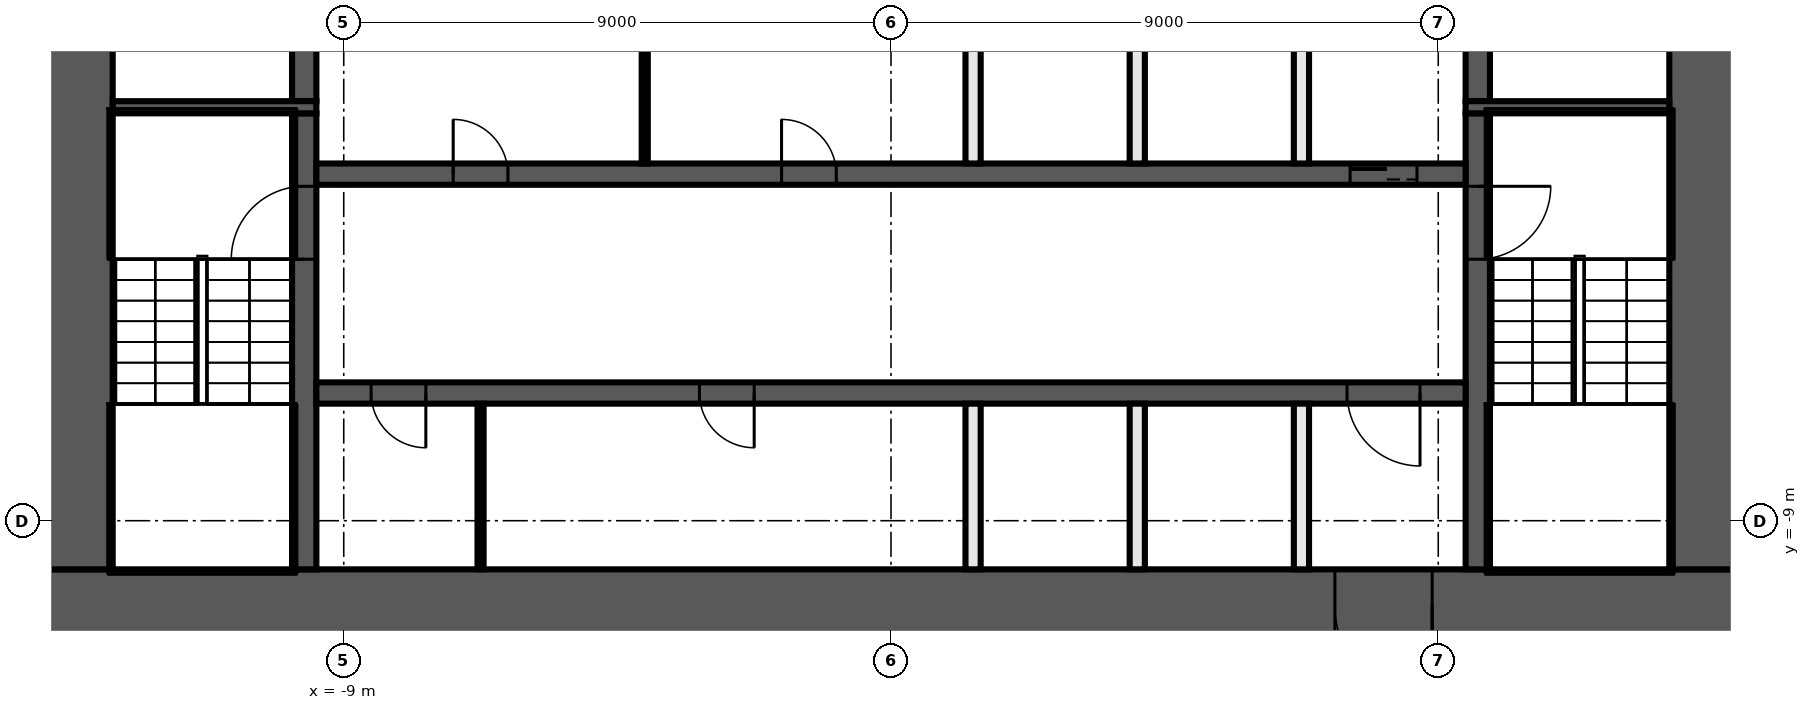
"""IFC4 building model, lengths in metres.
Left out: names, types, materials, properties, quantities, classifications, styles, units other than length and angle.
Written with IfcOpenShell. Run it as: python <this file> out.ifc"""

import sys

from ifc_helpers import new_model, si_unit, direction, frame, frame_2d, origin, place, context, subcontext, project, spatial, rectangle, extrude, element, fill, save


model = new_model("IFC4")
c1 = context("Model", 3, precision=1e-05, world=origin(), true_north=direction((0.0, 1.0)))
c2 = subcontext(c1, "Body", "Model", "MODEL_VIEW")
j1 = project(units=[si_unit("LENGTHUNIT", "METRE"), si_unit("PLANEANGLEUNIT", "RADIAN")], contexts=[c1])
p1 = place(None, origin())
s1 = spatial("IfcSite", under=j1, at=p1, CompositionType="ELEMENT")
p2 = place(p1, origin())
s2 = spatial("IfcBuilding", under=s1, at=p2, CompositionType="ELEMENT")
p3 = place(p2, frame((0.0, 0.0, 19.0)))
s3 = spatial("IfcBuildingStorey", under=s2, at=p3, CompositionType="ELEMENT", Elevation=19.0)
p4 = place(p3, frame((14.0, -10.4, 0.0), z_axis=(0.0, 0.0, 1.0), x_axis=(-1.0, 0.0, 0.0)))
e1 = element("IfcWall", 1, at=p4, inside=s3, PredefinedType="SHEAR", context=c2, shape_type="SweptSolid", body=[
    extrude(rectangle(XDim=28.0, YDim=1.2, at=frame_2d((14.0, 0.0))), origin(), (0.0, 0.0, 1.0), 7.55),
])
p5 = place(p4, frame((5.1, 0.0, 0.0)))
e2 = element("IfcOpeningElement", 2, at=p5, cuts=e1, PredefinedType="OPENING", context=c2, shape_type="SweptSolid", body=[
    extrude(rectangle(XDim=1.6, YDim=2.1, at=frame_2d((0.8, 1.05))), frame((0.0, 0.61, 0.0), z_axis=(0.0, -1.0, 0.0), x_axis=(1.0, 0.0, 0.0)), (0.0, 0.0, 1.0), 1.22),
])
for number, where, z_axis, x_axis in (
    (3, (13.4, 9.8, 0.0), (0.0, 0.0, 1.0), (0.0, -1.0, 0.0)),
    (4, (-13.4, -9.8, 0.0), (0.0, 0.0, 1.0), (0.0, 1.0, 0.0)),
):
    element("IfcWall", number, at=place(p3, frame(where, z_axis=z_axis, x_axis=x_axis)), inside=s3, PredefinedType="SHEAR", context=c2, shape_type="SweptSolid", body=[
        extrude(rectangle(XDim=19.6, YDim=1.2, at=frame_2d((9.8, 0.0))), origin(), (0.0, 0.0, 1.0), 7.55),
    ])
p6 = place(p3, frame((9.65, -2.3, 0.0), z_axis=(0.0, 0.0, 1.0), x_axis=(0.0, -1.0, 0.0)))
e5 = element("IfcWall", 5, at=p6, inside=s3, PredefinedType="SHEAR", context=c2, shape_type="SweptSolid", body=[
    extrude(rectangle(XDim=7.5, YDim=0.4, at=frame_2d((3.75, 0.0))), origin(), (0.0, 0.0, 1.0), 7.55),
])
p7 = place(p6, frame((1.2, 0.0, 0.0)))
e6 = element("IfcOpeningElement", 6, at=p7, cuts=e5, PredefinedType="OPENING", context=c2, shape_type="SweptSolid", body=[
    extrude(rectangle(XDim=1.2, YDim=2.1, at=frame_2d((0.6, 1.05))), frame((0.0, 0.21, 0.0), z_axis=(0.0, -1.0, 0.0), x_axis=(1.0, 0.0, 0.0)), (0.0, 0.0, 1.0), 0.42),
])
p8 = place(p3, frame((9.65, 2.1, 0.0), z_axis=(0.0, 0.0, 1.0), x_axis=(0.0, -1.0, 0.0)))
e7 = element("IfcWall", 7, at=p8, inside=s3, PredefinedType="SHEAR", context=c2, shape_type="SweptSolid", body=[
    extrude(rectangle(XDim=4.2, YDim=0.4, at=frame_2d((2.1, 0.0))), origin(), (0.0, 0.0, 1.0), 7.55),
])
p9 = place(p8, frame((0.15, 0.0, 0.0)))
e8 = element("IfcOpeningElement", 8, at=p9, cuts=e7, PredefinedType="OPENING", context=c2, shape_type="SweptSolid", body=[
    extrude(rectangle(XDim=0.9, YDim=2.1, at=frame_2d((0.45, 1.05))), frame((0.0, 0.21, 0.0), z_axis=(0.0, -1.0, 0.0), x_axis=(1.0, 0.0, 0.0)), (0.0, 0.0, 1.0), 0.42),
])
p10 = place(p3, frame((-9.65, -9.8, 0.0), z_axis=(0.0, 0.0, 1.0), x_axis=(0.0, 1.0, 0.0)))
e9 = element("IfcWall", 9, at=p10, inside=s3, PredefinedType="SHEAR", context=c2, shape_type="SweptSolid", body=[
    extrude(rectangle(XDim=7.5, YDim=0.4, at=frame_2d((3.75, 0.0))), origin(), (0.0, 0.0, 1.0), 7.55),
])
p11 = place(p10, frame((5.1, 0.0, 0.0)))
e10 = element("IfcOpeningElement", 10, at=p11, cuts=e9, PredefinedType="OPENING", context=c2, shape_type="SweptSolid", body=[
    extrude(rectangle(XDim=1.2, YDim=2.1, at=frame_2d((0.6, 1.05))), frame((0.0, 0.21, 0.0), z_axis=(0.0, -1.0, 0.0), x_axis=(1.0, 0.0, 0.0)), (0.0, 0.0, 1.0), 0.42),
])
p12 = place(p3, frame((-9.65, -2.1, 0.0), z_axis=(0.0, 0.0, 1.0), x_axis=(0.0, 1.0, 0.0)))
e11 = element("IfcWall", 11, at=p12, inside=s3, PredefinedType="SHEAR", context=c2, shape_type="SweptSolid", body=[
    extrude(rectangle(XDim=4.2, YDim=0.4, at=frame_2d((2.1, 0.0))), origin(), (0.0, 0.0, 1.0), 7.55),
])
for number, where, z_axis, x_axis in (
    (12, (9.45, -2.2, 0.0), (0.0, 0.0, 1.0), (1.0, 0.0, 0.0)),
    (13, (-9.45, -2.2, 0.0), (0.0, 0.0, 1.0), (-1.0, 0.0, 0.0)),
):
    element("IfcWall", number, at=place(p3, frame(where, z_axis=z_axis, x_axis=x_axis)), inside=s3, PredefinedType="SHEAR", context=c2, shape_type="SweptSolid", body=[
        extrude(rectangle(XDim=3.35, YDim=0.2, at=frame_2d((1.675, 0.0))), origin(), (0.0, 0.0, 1.0), 7.55),
    ])
p13 = place(p3, frame((-9.45, -3.3, 0.0), z_axis=(0.0, 0.0, 1.0), x_axis=(1.0, 0.0, 0.0)))
e14 = element("IfcWall", 14, at=p13, inside=s3, PredefinedType="SHEAR", context=c2, shape_type="SweptSolid", body=[
    extrude(rectangle(XDim=18.9, YDim=0.35, at=frame_2d((9.45, 0.0))), origin(), (0.0, 0.0, 1.0), 7.55),
])
p14 = place(p13, frame((17.0, 0.0, 0.0)))
e15 = element("IfcOpeningElement", 15, at=p14, cuts=e14, PredefinedType="OPENING", context=c2, shape_type="SweptSolid", body=[
    extrude(rectangle(XDim=1.1, YDim=2.1, at=frame_2d((0.55, 1.05))), frame((0.0, 0.185, 0.0), z_axis=(0.0, -1.0, 0.0), x_axis=(1.0, 0.0, 0.0)), (0.0, 0.0, 1.0), 0.37),
])
p15 = place(p13, frame((2.25, 0.0, 0.0)))
e16 = element("IfcOpeningElement", 16, at=p15, cuts=e14, PredefinedType="OPENING", context=c2, shape_type="SweptSolid", body=[
    extrude(rectangle(XDim=0.9, YDim=2.1, at=frame_2d((0.45, 1.05))), frame((0.0, 0.185, 0.0), z_axis=(0.0, -1.0, 0.0), x_axis=(1.0, 0.0, 0.0)), (0.0, 0.0, 1.0), 0.37),
])
p16 = place(p13, frame((7.65, 0.0, 0.0)))
e17 = element("IfcOpeningElement", 17, at=p16, cuts=e14, PredefinedType="OPENING", context=c2, shape_type="SweptSolid", body=[
    extrude(rectangle(XDim=0.9, YDim=2.1, at=frame_2d((0.45, 1.05))), frame((0.0, 0.185, 0.0), z_axis=(0.0, -1.0, 0.0), x_axis=(1.0, 0.0, 0.0)), (0.0, 0.0, 1.0), 0.37),
])
p17 = place(p3, frame((9.45, -6.9, 0.0), z_axis=(0.0, 0.0, 1.0), x_axis=(-1.0, 0.0, 0.0)))
e18 = element("IfcWall", 18, at=p17, inside=s3, PredefinedType="SHEAR", context=c2, shape_type="SweptSolid", body=[
    extrude(rectangle(XDim=18.9, YDim=0.35, at=frame_2d((9.45, 0.0))), origin(), (0.0, 0.0, 1.0), 7.55),
])
p18 = place(p17, frame((0.75, 0.0, 0.0)))
e19 = element("IfcOpeningElement", 19, at=p18, cuts=e18, PredefinedType="OPENING", context=c2, shape_type="SweptSolid", body=[
    extrude(rectangle(XDim=1.2, YDim=2.1, at=frame_2d((0.6, 1.05))), frame((0.0, 0.185, 0.0), z_axis=(0.0, -1.0, 0.0), x_axis=(1.0, 0.0, 0.0)), (0.0, 0.0, 1.0), 0.37),
])
p19 = place(p17, frame((17.1, 0.0, 0.0)))
e20 = element("IfcOpeningElement", 20, at=p19, cuts=e18, PredefinedType="OPENING", context=c2, shape_type="SweptSolid", body=[
    extrude(rectangle(XDim=0.9, YDim=2.1, at=frame_2d((0.45, 1.05))), frame((0.0, 0.185, 0.0), z_axis=(0.0, -1.0, 0.0), x_axis=(1.0, 0.0, 0.0)), (0.0, 0.0, 1.0), 0.37),
])
p20 = place(p17, frame((11.7, 0.0, 0.0)))
e21 = element("IfcOpeningElement", 21, at=p20, cuts=e18, PredefinedType="OPENING", context=c2, shape_type="SweptSolid", body=[
    extrude(rectangle(XDim=0.9, YDim=2.1, at=frame_2d((0.45, 1.05))), frame((0.0, 0.185, 0.0), z_axis=(0.0, -1.0, 0.0), x_axis=(1.0, 0.0, 0.0)), (0.0, 0.0, 1.0), 0.37),
])
for number, where, z_axis, x_axis in (
    (22, (6.75, -9.8, 0.0), (0.0, 0.0, 1.0), (0.0, 1.0, 0.0)),
    (23, (6.75, -3.125, 0.0), (0.0, 0.0, 1.0), (0.0, 1.0, 0.0)),
    (24, (4.05, -9.8, 0.0), (0.0, 0.0, 1.0), (0.0, 1.0, 0.0)),
    (25, (4.05, -3.125, 0.0), (0.0, 0.0, 1.0), (0.0, 1.0, 0.0)),
    (26, (1.35, -9.8, 0.0), (0.0, 0.0, 1.0), (0.0, 1.0, 0.0)),
    (27, (1.35, -3.125, 0.0), (0.0, 0.0, 1.0), (0.0, 1.0, 0.0)),
):
    element("IfcWall", number, at=place(p3, frame(where, z_axis=z_axis, x_axis=x_axis)), inside=s3, PredefinedType="SOLIDWALL", context=c2, shape_type="SweptSolid", body=[
        extrude(rectangle(XDim=2.725, YDim=0.25, at=frame_2d((1.363, 0.0))), origin(), (0.0, 0.0, 1.0), 7.55),
    ])
for number, where, z_axis, x_axis in (
    (28, (-4.05, -3.125, 0.0), (0.0, 0.0, 1.0), (0.0, 1.0, 0.0)),
    (29, (-6.75, -9.8, 0.0), (0.0, 0.0, 1.0), (0.0, 1.0, 0.0)),
):
    element("IfcWall", number, at=place(p3, frame(where, z_axis=z_axis, x_axis=x_axis)), inside=s3, PredefinedType="PARTITIONING", context=c2, shape_type="SweptSolid", body=[
        extrude(rectangle(XDim=2.725, YDim=0.1, at=frame_2d((1.363, 0.0))), origin(), (0.0, 0.0, 1.0), 7.55),
    ])
p21 = place(p14, origin())
e30 = element("IfcDoor", 30, at=p21, inside=s3, OperationType="DOUBLE_DOOR_SLIDING", PredefinedType="DOOR", context=c2, shape_type="SweptSolid", body=[
    extrude(rectangle(XDim=1.1, YDim=2.1, at=frame_2d((0.55, 1.05))), frame((0.0, 0.025, 0.0), z_axis=(0.0, -1.0, 0.0), x_axis=(1.0, 0.0, 0.0)), (0.0, 0.0, 1.0), 0.05),
])
fill(e15, e30)
p22 = place(p5, origin())
e31 = element("IfcDoor", 31, at=p22, inside=s3, OperationType="DOUBLE_DOOR_SINGLE_SWING", PredefinedType="DOOR", context=c2, shape_type="SweptSolid", body=[
    extrude(rectangle(XDim=1.6, YDim=2.1, at=frame_2d((0.8, 1.05))), frame((0.0, 0.025, 0.0), z_axis=(0.0, -1.0, 0.0), x_axis=(1.0, 0.0, 0.0)), (0.0, 0.0, 1.0), 0.05),
])
fill(e2, e31)
p23 = place(p18, origin())
e32 = element("IfcDoor", 32, at=p23, inside=s3, OperationType="SINGLE_SWING_LEFT", PredefinedType="DOOR", context=c2, shape_type="SweptSolid", body=[
    extrude(rectangle(XDim=1.2, YDim=2.1, at=frame_2d((0.6, 1.05))), frame((0.0, 0.025, 0.0), z_axis=(0.0, -1.0, 0.0), x_axis=(1.0, 0.0, 0.0)), (0.0, 0.0, 1.0), 0.05),
])
fill(e19, e32)
p24 = place(p15, origin())
e33 = element("IfcDoor", 33, at=p24, inside=s3, OperationType="SINGLE_SWING_RIGHT", PredefinedType="DOOR", context=c2, shape_type="SweptSolid", body=[
    extrude(rectangle(XDim=0.9, YDim=2.1, at=frame_2d((0.45, 1.05))), frame((0.0, 0.025, 0.0), z_axis=(0.0, -1.0, 0.0), x_axis=(1.0, 0.0, 0.0)), (0.0, 0.0, 1.0), 0.05),
])
fill(e16, e33)
p25 = place(p16, origin())
e34 = element("IfcDoor", 34, at=p25, inside=s3, OperationType="SINGLE_SWING_LEFT", PredefinedType="DOOR", context=c2, shape_type="SweptSolid", body=[
    extrude(rectangle(XDim=0.9, YDim=2.1, at=frame_2d((0.45, 1.05))), frame((0.0, 0.025, 0.0), z_axis=(0.0, -1.0, 0.0), x_axis=(1.0, 0.0, 0.0)), (0.0, 0.0, 1.0), 0.05),
])
fill(e17, e34)
p26 = place(p19, origin())
e35 = element("IfcDoor", 35, at=p26, inside=s3, OperationType="SINGLE_SWING_RIGHT", PredefinedType="DOOR", context=c2, shape_type="SweptSolid", body=[
    extrude(rectangle(XDim=0.9, YDim=2.1, at=frame_2d((0.45, 1.05))), frame((0.0, 0.025, 0.0), z_axis=(0.0, -1.0, 0.0), x_axis=(1.0, 0.0, 0.0)), (0.0, 0.0, 1.0), 0.05),
])
fill(e20, e35)
p27 = place(p20, origin())
e36 = element("IfcDoor", 36, at=p27, inside=s3, OperationType="SINGLE_SWING_LEFT", PredefinedType="DOOR", context=c2, shape_type="SweptSolid", body=[
    extrude(rectangle(XDim=0.9, YDim=2.1, at=frame_2d((0.45, 1.05))), frame((0.0, 0.025, 0.0), z_axis=(0.0, -1.0, 0.0), x_axis=(1.0, 0.0, 0.0)), (0.0, 0.0, 1.0), 0.05),
])
fill(e21, e36)
p28 = place(p7, origin())
e37 = element("IfcDoor", 37, at=p28, inside=s3, OperationType="SINGLE_SWING_RIGHT", PredefinedType="DOOR", context=c2, shape_type="SweptSolid", body=[
    extrude(rectangle(XDim=1.2, YDim=2.1, at=frame_2d((0.6, 1.05))), frame((0.0, 0.025, 0.0), z_axis=(0.0, -1.0, 0.0), x_axis=(1.0, 0.0, 0.0)), (0.0, 0.0, 1.0), 0.05),
])
fill(e6, e37)
p29 = place(p11, origin())
e38 = element("IfcDoor", 38, at=p29, inside=s3, OperationType="SINGLE_SWING_LEFT", PredefinedType="DOOR", context=c2, shape_type="SweptSolid", body=[
    extrude(rectangle(XDim=1.2, YDim=2.1, at=frame_2d((0.6, 1.05))), frame((0.0, 0.025, 0.0), z_axis=(0.0, -1.0, 0.0), x_axis=(1.0, 0.0, 0.0)), (0.0, 0.0, 1.0), 0.05),
])
fill(e10, e38)
save(model, sys.argv[1])
